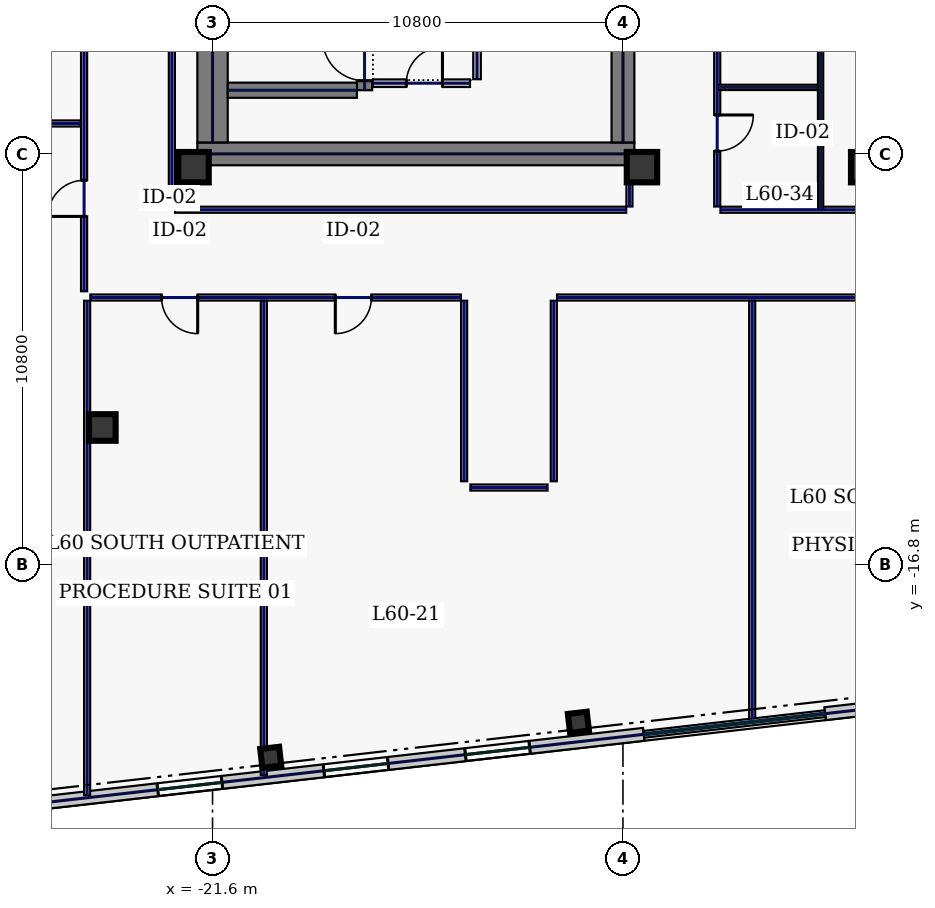
"""IFC4 building model, lengths in metres.
Left out: names, types, materials, properties, quantities, classifications, styles, units other than length and angle.
Written with IfcOpenShell. Run it as: python <this file> out.ifc"""

import sys

from ifc_helpers import new_model, si_unit, direction, frame, frame_2d, origin, origin_2d, place, context, subcontext, project, spatial, rectangle, hollow_rectangle, extrude, element, fill, save


model = new_model("IFC4")
c1 = context("Model", 3, precision=1e-05, world=origin(), true_north=direction((0.0, 1.0)))
c2 = subcontext(c1, "Body", "Model", "MODEL_VIEW")
j1 = project(units=[si_unit("LENGTHUNIT", "METRE"), si_unit("PLANEANGLEUNIT", "RADIAN")], contexts=[c1])
p1 = place(None, origin())
s1 = spatial("IfcSite", under=j1, at=p1, CompositionType="ELEMENT")
p2 = place(p1, origin())
s2 = spatial("IfcBuilding", under=s1, at=p2, CompositionType="ELEMENT")
p3 = place(p2, frame((0.0, 0.0, 259.0)))
s3 = spatial("IfcBuildingStorey", under=s2, at=p3, CompositionType="ELEMENT", Elevation=259.0)
p4 = place(p3, frame((-22.0, -6.0, 0.0), z_axis=(0.0, 0.0, 1.0), x_axis=(1.0, 0.0, 0.0)))
e1 = element("IfcWall", 1, at=p4, inside=s3, PredefinedType="SHEAR", context=c2, shape_type="SweptSolid", body=[
    extrude(rectangle(XDim=11.5, YDim=0.6, at=frame_2d((5.75, 0.0))), origin(), (0.0, 0.0, 1.0), 3.74),
])
p5 = place(p3, frame((-21.6, -5.7, 0.0), z_axis=(0.0, 0.0, 1.0), x_axis=(0.0, 1.0, 0.0)))
e2 = element("IfcWall", 2, at=p5, inside=s3, PredefinedType="SHEAR", context=c2, shape_type="SweptSolid", body=[
    extrude(rectangle(XDim=11.4, YDim=0.8, at=frame_2d((5.7, 0.0))), origin(), (0.0, 0.0, 1.0), 3.74),
])
p6 = place(p3, frame((-10.8, -5.7, 0.0), z_axis=(0.0, 0.0, 1.0), x_axis=(0.0, 1.0, 0.0)))
e3 = element("IfcWall", 3, at=p6, inside=s3, PredefinedType="SHEAR", context=c2, shape_type="SweptSolid", body=[
    extrude(rectangle(XDim=3.05, YDim=0.6, at=frame_2d((1.525, 0.0))), origin(), (0.0, 0.0, 1.0), 3.74),
])
p7 = place(p3, frame((-17.6, -4.325, 0.0), z_axis=(0.0, 0.0, 1.0), x_axis=(0.0, 1.0, 0.0)))
e4 = element("IfcWall", 4, at=p7, inside=s3, PredefinedType="SHEAR", context=c2, shape_type="SweptSolid", body=[
    extrude(rectangle(XDim=8.65, YDim=0.4, at=frame_2d((4.325, 0.0))), origin(), (0.0, 0.0, 1.0), 3.74),
])
p8 = place(p7, frame((0.25, 0.0, 0.0)))
e5 = element("IfcOpeningElement", 5, at=p8, cuts=e4, PredefinedType="OPENING", context=c2, shape_type="SweptSolid", body=[
    extrude(rectangle(XDim=1.1, YDim=2.2, at=frame_2d((0.55, 1.1))), frame((0.0, 0.21, 0.0), z_axis=(0.0, -1.0, 0.0), x_axis=(1.0, 0.0, 0.0)), (0.0, 0.0, 1.0), 0.42),
])
p9 = place(p3, frame((-21.2, -4.325, 0.0), z_axis=(0.0, 0.0, 1.0), x_axis=(1.0, 0.0, 0.0)))
e6 = element("IfcWall", 6, at=p9, inside=s3, PredefinedType="SHEAR", context=c2, shape_type="SweptSolid", body=[
    extrude(rectangle(XDim=3.4, YDim=0.4, at=frame_2d((1.7, 0.0))), origin(), (0.0, 0.0, 1.0), 3.74),
])
for number, where, z_axis, x_axis in (
    (7, (-22.1, -6.35, 0.0), (0.0, 0.0, 1.0), (1.0, 0.0, 0.0)),
    (8, (-10.3, -6.35, 0.0), (0.0, 0.0, 1.0), (1.0, 0.0, 0.0)),
    (9, (-4.4, -6.35, 0.0), (0.0, 0.0, 1.0), (1.0, 0.0, 0.0)),
):
    element("IfcColumn", number, at=place(p3, frame(where, z_axis=z_axis, x_axis=x_axis)), inside=s3, PredefinedType="COLUMN", context=c2, shape_type="SweptSolid", body=[
        extrude(hollow_rectangle(XDim=0.8, YDim=0.8, WallThickness=0.036, at=origin_2d()), origin(), (0.0, 0.0, 1.0), 3.74),
    ])
p10 = place(p3, frame((-24.5, -13.2, 0.0), z_axis=(0.0, 0.0, 1.0), x_axis=(1.0, 0.0, 0.0)))
e10 = element("IfcColumn", 10, at=p10, inside=s3, PredefinedType="COLUMN", context=c2, shape_type="SweptSolid", body=[
    extrude(hollow_rectangle(XDim=0.7, YDim=0.7, WallThickness=0.032, at=origin_2d()), origin(), (0.0, 0.0, 1.0), 3.74),
])
for number, where, z_axis, x_axis in (
    (11, (-20.069, -21.88, 0.0), (0.0, 0.0, 1.0), (0.994, 0.113, 0.0)),
    (12, (-11.972, -20.958, 0.0), (0.0, 0.0, 1.0), (0.994, 0.113, 0.0)),
):
    element("IfcColumn", number, at=place(p3, frame(where, z_axis=z_axis, x_axis=x_axis)), inside=s3, PredefinedType="COLUMN", context=c2, shape_type="SweptSolid", body=[
        extrude(hollow_rectangle(XDim=0.5, YDim=0.5, WallThickness=0.025, at=origin_2d()), origin(), (0.0, 0.0, 1.0), 3.74),
    ])
p11 = place(p3, frame((-28.783, -23.386, 0.0), z_axis=(0.0, 0.0, 1.0), x_axis=(0.993572271362, 0.113199565282, 0.0)))
e13 = element("IfcWall", 13, at=p11, inside=s3, PredefinedType="STANDARD", context=c2, shape_type="SweptSolid", body=[
    extrude(rectangle(XDim=18.651, YDim=0.34, at=frame_2d((9.326, 0.0))), origin(), (0.0, 0.0, 1.0), 3.74),
])
p12 = place(p11, frame((2.03, 0.0, 0.88)))
e14 = element("IfcOpeningElement", 14, at=p12, cuts=e13, PredefinedType="OPENING", context=c2, shape_type="SweptSolid", body=[
    extrude(rectangle(XDim=0.85, YDim=1.85, at=frame_2d((0.425, 0.925))), frame((0.0, 0.18, 0.0), z_axis=(0.0, -1.0, 0.0), x_axis=(1.0, 0.0, 0.0)), (0.0, 0.0, 1.0), 0.36),
])
p13 = place(p11, frame((5.779, 0.0, 0.88)))
e15 = element("IfcOpeningElement", 15, at=p13, cuts=e13, PredefinedType="OPENING", context=c2, shape_type="SweptSolid", body=[
    extrude(rectangle(XDim=1.7, YDim=1.95, at=frame_2d((0.85, 0.975))), frame((0.0, 0.18, 0.0), z_axis=(0.0, -1.0, 0.0), x_axis=(1.0, 0.0, 0.0)), (0.0, 0.0, 1.0), 0.36),
])
p14 = place(p11, frame((10.179, 0.0, 0.88)))
e16 = element("IfcOpeningElement", 16, at=p14, cuts=e13, PredefinedType="OPENING", context=c2, shape_type="SweptSolid", body=[
    extrude(rectangle(XDim=1.7, YDim=1.95, at=frame_2d((0.85, 0.975))), frame((0.0, 0.18, 0.0), z_axis=(0.0, -1.0, 0.0), x_axis=(1.0, 0.0, 0.0)), (0.0, 0.0, 1.0), 0.36),
])
p15 = place(p11, frame((13.927, 0.0, 0.88)))
e17 = element("IfcOpeningElement", 17, at=p15, cuts=e13, PredefinedType="OPENING", context=c2, shape_type="SweptSolid", body=[
    extrude(rectangle(XDim=1.7, YDim=1.95, at=frame_2d((0.85, 0.975))), frame((0.0, 0.18, 0.0), z_axis=(0.0, -1.0, 0.0), x_axis=(1.0, 0.0, 0.0)), (0.0, 0.0, 1.0), 0.36),
])
p16 = place(p3, frame((-5.482, -20.731, 0.0), z_axis=(0.0, 0.0, 1.0), x_axis=(0.993571968199, 0.113202226169, 0.0)))
e18 = element("IfcWall", 18, at=p16, inside=s3, PredefinedType="STANDARD", context=c2, shape_type="SweptSolid", body=[
    extrude(rectangle(XDim=11.497, YDim=0.34, at=frame_2d((5.749, 0.0))), origin(), (0.0, 0.0, 1.0), 3.74),
])
p17 = place(p16, frame((3.024, 0.0, 0.88)))
e19 = element("IfcOpeningElement", 19, at=p17, cuts=e18, PredefinedType="OPENING", context=c2, shape_type="SweptSolid", body=[
    extrude(rectangle(XDim=1.7, YDim=1.95, at=frame_2d((0.85, 0.975))), frame((0.0, 0.18, 0.0), z_axis=(0.0, -1.0, 0.0), x_axis=(1.0, 0.0, 0.0)), (0.0, 0.0, 1.0), 0.36),
])
p18 = place(p16, frame((7.623, 0.0, 0.88)))
e20 = element("IfcOpeningElement", 20, at=p18, cuts=e18, PredefinedType="OPENING", context=c2, shape_type="SweptSolid", body=[
    extrude(rectangle(XDim=0.85, YDim=1.85, at=frame_2d((0.425, 0.925))), frame((0.0, 0.18, 0.0), z_axis=(0.0, -1.0, 0.0), x_axis=(1.0, 0.0, 0.0)), (0.0, 0.0, 1.0), 0.36),
])
p19 = place(p3, frame((-17.38, -4.14, 0.0), z_axis=(0.0, 0.0, 1.0), x_axis=(1.0, 0.0, 0.0)))
e21 = element("IfcWall", 21, at=p19, inside=s3, PredefinedType="SOLIDWALL", context=c2, shape_type="SweptSolid", body=[
    extrude(rectangle(XDim=2.555, YDim=0.2, at=frame_2d((1.277, 0.0))), origin(), (0.0, 0.0, 1.0), 3.74),
])
p20 = place(p19, frame((0.88, 0.0, 0.0)))
e22 = element("IfcOpeningElement", 22, at=p20, cuts=e21, PredefinedType="OPENING", context=c2, shape_type="SweptSolid", body=[
    extrude(rectangle(XDim=0.95, YDim=2.2, at=frame_2d((0.475, 1.1))), frame((0.0, 0.11, 0.0), z_axis=(0.0, -1.0, 0.0), x_axis=(1.0, 0.0, 0.0)), (0.0, 0.0, 1.0), 0.22),
])
p21 = place(p3, frame((-14.64, -4.035, 0.0), z_axis=(0.0, 0.0, 1.0), x_axis=(0.0, 1.0, 0.0)))
e23 = element("IfcWall", 23, at=p21, inside=s3, PredefinedType="SOLIDWALL", context=c2, shape_type="SweptSolid", body=[
    extrude(rectangle(XDim=4.075, YDim=0.2, at=frame_2d((2.038, 0.0))), origin(), (0.0, 0.0, 1.0), 3.74),
])
p22 = place(p21, frame((2.09, 0.0, 0.0)))
e24 = element("IfcOpeningElement", 24, at=p22, cuts=e23, PredefinedType="OPENING", context=c2, shape_type="SweptSolid", body=[
    extrude(rectangle(XDim=1.2, YDim=2.2, at=frame_2d((0.6, 1.1))), frame((0.0, 0.11, 0.0), z_axis=(0.0, -1.0, 0.0), x_axis=(1.0, 0.0, 0.0)), (0.0, 0.0, 1.0), 0.22),
])
p23 = place(p3, frame((-24.98, -9.615, 0.0), z_axis=(0.0, 0.0, 1.0), x_axis=(0.0, 1.0, 0.0)))
e25 = element("IfcWall", 25, at=p23, inside=s3, PredefinedType="PARTITIONING", context=c2, shape_type="SweptSolid", body=[
    extrude(rectangle(XDim=19.28, YDim=0.16, at=frame_2d((9.64, 0.0))), origin(), (0.0, 0.0, 1.0), 3.74),
])
p24 = place(p23, frame((1.969, 0.0, 0.0)))
e26 = element("IfcOpeningElement", 26, at=p24, cuts=e25, PredefinedType="OPENING", context=c2, shape_type="SweptSolid", body=[
    extrude(rectangle(XDim=0.95, YDim=2.2, at=frame_2d((0.475, 1.1))), frame((0.0, 0.09, 0.0), z_axis=(0.0, -1.0, 0.0), x_axis=(1.0, 0.0, 0.0)), (0.0, 0.0, 1.0), 0.18),
])
p25 = place(p23, frame((7.25, 0.0, 0.0)))
e27 = element("IfcOpeningElement", 27, at=p25, cuts=e25, PredefinedType="OPENING", context=c2, shape_type="SweptSolid", body=[
    extrude(rectangle(XDim=0.95, YDim=2.2, at=frame_2d((0.475, 1.1))), frame((0.0, 0.09, 0.0), z_axis=(0.0, -1.0, 0.0), x_axis=(1.0, 0.0, 0.0)), (0.0, 0.0, 1.0), 0.18),
])
p26 = place(p23, frame((12.45, 0.0, 0.0)))
e28 = element("IfcOpeningElement", 28, at=p26, cuts=e25, PredefinedType="OPENING", context=c2, shape_type="SweptSolid", body=[
    extrude(rectangle(XDim=0.95, YDim=2.2, at=frame_2d((0.475, 1.1))), frame((0.0, 0.09, 0.0), z_axis=(0.0, -1.0, 0.0), x_axis=(1.0, 0.0, 0.0)), (0.0, 0.0, 1.0), 0.18),
])
p27 = place(p23, frame((16.506, 0.0, 0.0)))
e29 = element("IfcOpeningElement", 29, at=p27, cuts=e25, PredefinedType="OPENING", context=c2, shape_type="SweptSolid", body=[
    extrude(rectangle(XDim=0.95, YDim=2.2, at=frame_2d((0.475, 1.1))), frame((0.0, 0.09, 0.0), z_axis=(0.0, -1.0, 0.0), x_axis=(1.0, 0.0, 0.0)), (0.0, 0.0, 1.0), 0.18),
])
p28 = place(p3, frame((24.815, -9.78, 0.0), z_axis=(0.0, 0.0, 1.0), x_axis=(-1.0, 0.0, 0.0)))
e30 = element("IfcWall", 30, at=p28, inside=s3, PredefinedType="PARTITIONING", context=c2, shape_type="SweptSolid", body=[
    extrude(rectangle(XDim=37.35, YDim=0.16, at=frame_2d((18.675, 0.0))), origin(), (0.0, 0.0, 1.0), 3.74),
])
p29 = place(p28, frame((27.55, 0.0, 0.0)))
e31 = element("IfcOpeningElement", 31, at=p29, cuts=e30, PredefinedType="OPENING", context=c2, shape_type="SweptSolid", body=[
    extrude(rectangle(XDim=0.95, YDim=2.2, at=frame_2d((0.475, 1.1))), frame((0.0, 0.09, 0.0), z_axis=(0.0, -1.0, 0.0), x_axis=(1.0, 0.0, 0.0)), (0.0, 0.0, 1.0), 0.18),
])
p30 = place(p28, frame((19.275, 0.0, 0.0)))
e32 = element("IfcOpeningElement", 32, at=p30, cuts=e30, PredefinedType="OPENING", context=c2, shape_type="SweptSolid", body=[
    extrude(rectangle(XDim=1.3, YDim=2.2, at=frame_2d((0.65, 1.1))), frame((0.0, 0.09, 0.0), z_axis=(0.0, -1.0, 0.0), x_axis=(1.0, 0.0, 0.0)), (0.0, 0.0, 1.0), 0.18),
])
p31 = place(p28, frame((9.725, 0.0, 0.0)))
e33 = element("IfcOpeningElement", 33, at=p31, cuts=e30, PredefinedType="OPENING", context=c2, shape_type="SweptSolid", body=[
    extrude(rectangle(XDim=1.3, YDim=2.2, at=frame_2d((0.65, 1.1))), frame((0.0, 0.09, 0.0), z_axis=(0.0, -1.0, 0.0), x_axis=(1.0, 0.0, 0.0)), (0.0, 0.0, 1.0), 0.18),
])
p32 = place(p28, frame((2.044, 0.0, 0.0)))
e34 = element("IfcOpeningElement", 34, at=p32, cuts=e30, PredefinedType="OPENING", context=c2, shape_type="SweptSolid", body=[
    extrude(rectangle(XDim=0.95, YDim=2.2, at=frame_2d((0.475, 1.1))), frame((0.0, 0.09, 0.0), z_axis=(0.0, -1.0, 0.0), x_axis=(1.0, 0.0, 0.0)), (0.0, 0.0, 1.0), 0.18),
])
p33 = place(p3, frame((-12.62, -9.865, 0.0), z_axis=(0.0, 0.0, 1.0), x_axis=(0.0, -1.0, 0.0)))
e35 = element("IfcWall", 35, at=p33, inside=s3, PredefinedType="PARTITIONING", context=c2, shape_type="SweptSolid", body=[
    extrude(rectangle(XDim=4.75, YDim=0.16, at=frame_2d((2.375, 0.0))), origin(), (0.0, 0.0, 1.0), 3.74),
])
p34 = place(p3, frame((-12.785, -14.78, 0.0), z_axis=(0.0, 0.0, 1.0), x_axis=(-1.0, 0.0, 0.0)))
e36 = element("IfcWall", 36, at=p34, inside=s3, PredefinedType="PARTITIONING", context=c2, shape_type="SweptSolid", body=[
    extrude(rectangle(XDim=2.03, YDim=0.16, at=frame_2d((1.015, 0.0))), origin(), (0.0, 0.0, 1.0), 3.74),
])
p35 = place(p3, frame((-14.98, -14.615, 0.0), z_axis=(0.0, 0.0, 1.0), x_axis=(0.0, 1.0, 0.0)))
e37 = element("IfcWall", 37, at=p35, inside=s3, PredefinedType="PARTITIONING", context=c2, shape_type="SweptSolid", body=[
    extrude(rectangle(XDim=4.75, YDim=0.16, at=frame_2d((2.375, 0.0))), origin(), (0.0, 0.0, 1.0), 3.74),
])
p36 = place(p3, frame((-15.065, -9.78, 0.0), z_axis=(0.0, 0.0, 1.0), x_axis=(-1.0, 0.0, 0.0)))
e38 = element("IfcWall", 38, at=p36, inside=s3, PredefinedType="PARTITIONING", context=c2, shape_type="SweptSolid", body=[
    extrude(rectangle(XDim=9.75, YDim=0.16, at=frame_2d((4.875, 0.0))), origin(), (0.0, 0.0, 1.0), 3.74),
])
p37 = place(p36, frame((6.926, 0.0, 0.0)))
e39 = element("IfcOpeningElement", 39, at=p37, cuts=e38, PredefinedType="OPENING", context=c2, shape_type="SweptSolid", body=[
    extrude(rectangle(XDim=0.95, YDim=2.2, at=frame_2d((0.475, 1.1))), frame((0.0, 0.09, 0.0), z_axis=(0.0, -1.0, 0.0), x_axis=(1.0, 0.0, 0.0)), (0.0, 0.0, 1.0), 0.18),
])
p38 = place(p36, frame((2.354, 0.0, 0.0)))
e40 = element("IfcOpeningElement", 40, at=p38, cuts=e38, PredefinedType="OPENING", context=c2, shape_type="SweptSolid", body=[
    extrude(rectangle(XDim=0.95, YDim=2.2, at=frame_2d((0.475, 1.1))), frame((0.0, 0.09, 0.0), z_axis=(0.0, -1.0, 0.0), x_axis=(1.0, 0.0, 0.0)), (0.0, 0.0, 1.0), 0.18),
])
p39 = place(p3, frame((-8.32, 7.435, 0.0), z_axis=(0.0, 0.0, 1.0), x_axis=(0.0, -1.0, 0.0)))
e41 = element("IfcWall", 41, at=p39, inside=s3, PredefinedType="PARTITIONING", context=c2, shape_type="SweptSolid", body=[
    extrude(rectangle(XDim=14.82, YDim=0.16, at=frame_2d((7.41, 0.0))), origin(), (0.0, 0.0, 1.0), 3.74),
])
p40 = place(p39, frame((12.411, 0.0, 0.0)))
e42 = element("IfcOpeningElement", 42, at=p40, cuts=e41, PredefinedType="OPENING", context=c2, shape_type="SweptSolid", body=[
    extrude(rectangle(XDim=0.95, YDim=2.2, at=frame_2d((0.475, 1.1))), frame((0.0, 0.09, 0.0), z_axis=(0.0, -1.0, 0.0), x_axis=(1.0, 0.0, 0.0)), (0.0, 0.0, 1.0), 0.18),
])
p41 = place(p39, frame((5.604, 0.0, 0.0)))
e43 = element("IfcOpeningElement", 43, at=p41, cuts=e41, PredefinedType="OPENING", context=c2, shape_type="SweptSolid", body=[
    extrude(rectangle(XDim=0.95, YDim=2.2, at=frame_2d((0.475, 1.1))), frame((0.0, 0.09, 0.0), z_axis=(0.0, -1.0, 0.0), x_axis=(1.0, 0.0, 0.0)), (0.0, 0.0, 1.0), 0.18),
])
p42 = place(p3, frame((-8.235, -7.47, 0.0), z_axis=(0.0, 0.0, 1.0), x_axis=(1.0, 0.0, 0.0)))
e44 = element("IfcWall", 44, at=p42, inside=s3, PredefinedType="PARTITIONING", context=c2, shape_type="SweptSolid", body=[
    extrude(rectangle(XDim=4.27, YDim=0.16, at=frame_2d((2.135, 0.0))), origin(), (0.0, 0.0, 1.0), 3.74),
])
p43 = place(p3, frame((-10.63, -7.385, 0.0), z_axis=(0.0, 0.0, 1.0), x_axis=(0.0, 1.0, 0.0)))
e45 = element("IfcWall", 45, at=p43, inside=s3, PredefinedType="PARTITIONING", context=c2, shape_type="SweptSolid", body=[
    extrude(rectangle(XDim=0.965, YDim=0.16, at=frame_2d((0.482, 0.0))), origin(), (0.0, 0.0, 1.0), 3.74),
])
p44 = place(p3, frame((-22.67, 7.435, 0.0), z_axis=(0.0, 0.0, 1.0), x_axis=(0.0, -1.0, 0.0)))
e46 = element("IfcWall", 46, at=p44, inside=s3, PredefinedType="PARTITIONING", context=c2, shape_type="SweptSolid", body=[
    extrude(rectangle(XDim=14.82, YDim=0.16, at=frame_2d((7.41, 0.0))), origin(), (0.0, 0.0, 1.0), 3.74),
])
p45 = place(p3, frame((-22.585, -7.47, 0.0), z_axis=(0.0, 0.0, 1.0), x_axis=(1.0, 0.0, 0.0)))
e47 = element("IfcWall", 47, at=p45, inside=s3, PredefinedType="PARTITIONING", context=c2, shape_type="SweptSolid", body=[
    extrude(rectangle(XDim=11.87, YDim=0.16, at=frame_2d((5.935, 0.0))), origin(), (0.0, 0.0, 1.0), 3.74),
])
p46 = place(p3, frame((-24.9, -22.873, 0.0), z_axis=(0.0, 0.0, 1.0), x_axis=(0.0, 1.0, 0.0)))
e48 = element("IfcWall", 48, at=p46, inside=s3, PredefinedType="PARTITIONING", context=c2, shape_type="SweptSolid", body=[
    extrude(rectangle(XDim=13.008, YDim=0.16, at=frame_2d((6.504, 0.0))), origin(), (0.0, 0.0, 1.0), 3.74),
])
p47 = place(p3, frame((-20.25, -22.344, 0.0), z_axis=(0.0, 0.0, 1.0), x_axis=(0.0, 1.0, 0.0)))
e49 = element("IfcWall", 49, at=p47, inside=s3, PredefinedType="PARTITIONING", context=c2, shape_type="SweptSolid", body=[
    extrude(rectangle(XDim=12.479, YDim=0.16, at=frame_2d((6.239, 0.0))), origin(), (0.0, 0.0, 1.0), 3.74),
])
p48 = place(p3, frame((-7.4, -20.879, 0.0), z_axis=(0.0, 0.0, 1.0), x_axis=(0.0, 1.0, 0.0)))
e50 = element("IfcWall", 50, at=p48, inside=s3, PredefinedType="PARTITIONING", context=c2, shape_type="SweptSolid", body=[
    extrude(rectangle(XDim=11.014, YDim=0.16, at=frame_2d((5.507, 0.0))), origin(), (0.0, 0.0, 1.0), 3.74),
])
p49 = place(p3, frame((-35.494, -5.2, 0.0), z_axis=(0.0, 0.0, 1.0), x_axis=(1.0, 0.0, 0.0)))
e51 = element("IfcWall", 51, at=p49, inside=s3, PredefinedType="PARTITIONING", context=c2, shape_type="SweptSolid", body=[
    extrude(rectangle(XDim=10.429, YDim=0.16, at=frame_2d((5.215, 0.0))), origin(), (0.0, 0.0, 1.0), 3.74),
])
p50 = place(p3, frame((-5.6, -7.465, 0.0), z_axis=(0.0, 0.0, 1.0), x_axis=(0.0, 1.0, 0.0)))
e52 = element("IfcWall", 52, at=p50, inside=s3, PredefinedType="PARTITIONING", context=c2, shape_type="SweptSolid", body=[
    extrude(rectangle(XDim=14.98, YDim=0.14, at=frame_2d((7.49, 0.0))), origin(), (0.0, 0.0, 1.0), 3.74),
])
p51 = place(p3, frame((-8.315, -4.25, 0.0), z_axis=(0.0, 0.0, 1.0), x_axis=(1.0, 0.0, 0.0)))
e53 = element("IfcWall", 53, at=p51, inside=s3, PredefinedType="PARTITIONING", context=c2, shape_type="SweptSolid", body=[
    extrude(rectangle(XDim=2.64, YDim=0.14, at=frame_2d((1.32, 0.0))), origin(), (0.0, 0.0, 1.0), 3.74),
])
p52 = place(p13, origin())
e54 = element("IfcWindow", 54, at=p52, inside=s3, PartitioningType="SINGLE_PANEL", PredefinedType="WINDOW", context=c2, shape_type="SweptSolid", body=[
    extrude(rectangle(XDim=1.7, YDim=1.95, at=frame_2d((0.85, 0.975))), frame((0.0, 0.03, 0.0), z_axis=(0.0, -1.0, 0.0), x_axis=(1.0, 0.0, 0.0)), (0.0, 0.0, 1.0), 0.06),
])
fill(e15, e54)
p53 = place(p14, origin())
e55 = element("IfcWindow", 55, at=p53, inside=s3, PartitioningType="SINGLE_PANEL", PredefinedType="WINDOW", context=c2, shape_type="SweptSolid", body=[
    extrude(rectangle(XDim=1.7, YDim=1.95, at=frame_2d((0.85, 0.975))), frame((0.0, 0.03, 0.0), z_axis=(0.0, -1.0, 0.0), x_axis=(1.0, 0.0, 0.0)), (0.0, 0.0, 1.0), 0.06),
])
fill(e16, e55)
p54 = place(p15, origin())
e56 = element("IfcWindow", 56, at=p54, inside=s3, PartitioningType="SINGLE_PANEL", PredefinedType="WINDOW", context=c2, shape_type="SweptSolid", body=[
    extrude(rectangle(XDim=1.7, YDim=1.95, at=frame_2d((0.85, 0.975))), frame((0.0, 0.03, 0.0), z_axis=(0.0, -1.0, 0.0), x_axis=(1.0, 0.0, 0.0)), (0.0, 0.0, 1.0), 0.06),
])
fill(e17, e56)
p55 = place(p8, origin())
e57 = element("IfcDoor", 57, at=p55, inside=s3, OperationType="SINGLE_SWING_RIGHT", PredefinedType="DOOR", context=c2, shape_type="SweptSolid", body=[
    extrude(rectangle(XDim=1.1, YDim=2.2, at=frame_2d((0.55, 1.1))), frame((0.0, 0.025, 0.0), z_axis=(0.0, -1.0, 0.0), x_axis=(1.0, 0.0, 0.0)), (0.0, 0.0, 1.0), 0.05),
])
fill(e5, e57)
p56 = place(p20, origin())
e58 = element("IfcDoor", 58, at=p56, inside=s3, OperationType="SINGLE_SWING_RIGHT", PredefinedType="DOOR", context=c2, shape_type="SweptSolid", body=[
    extrude(rectangle(XDim=0.95, YDim=2.2, at=frame_2d((0.475, 1.1))), frame((0.0, 0.025, 0.0), z_axis=(0.0, -1.0, 0.0), x_axis=(1.0, 0.0, 0.0)), (0.0, 0.0, 1.0), 0.05),
])
fill(e22, e58)
p57 = place(p37, origin())
e59 = element("IfcDoor", 59, at=p57, inside=s3, OperationType="SINGLE_SWING_LEFT", PredefinedType="DOOR", context=c2, shape_type="SweptSolid", body=[
    extrude(rectangle(XDim=0.95, YDim=2.2, at=frame_2d((0.475, 1.1))), frame((0.0, 0.025, 0.0), z_axis=(0.0, -1.0, 0.0), x_axis=(1.0, 0.0, 0.0)), (0.0, 0.0, 1.0), 0.05),
])
fill(e39, e59)
p58 = place(p38, origin())
e60 = element("IfcDoor", 60, at=p58, inside=s3, OperationType="SINGLE_SWING_RIGHT", PredefinedType="DOOR", context=c2, shape_type="SweptSolid", body=[
    extrude(rectangle(XDim=0.95, YDim=2.2, at=frame_2d((0.475, 1.1))), frame((0.0, 0.025, 0.0), z_axis=(0.0, -1.0, 0.0), x_axis=(1.0, 0.0, 0.0)), (0.0, 0.0, 1.0), 0.05),
])
fill(e40, e60)
p59 = place(p24, origin())
e61 = element("IfcDoor", 61, at=p59, inside=s3, OperationType="SINGLE_SWING_LEFT", PredefinedType="DOOR", context=c2, shape_type="SweptSolid", body=[
    extrude(rectangle(XDim=0.95, YDim=2.2, at=frame_2d((0.475, 1.1))), frame((0.0, 0.025, 0.0), z_axis=(0.0, -1.0, 0.0), x_axis=(1.0, 0.0, 0.0)), (0.0, 0.0, 1.0), 0.05),
])
fill(e26, e61)
p60 = place(p40, origin())
e62 = element("IfcDoor", 62, at=p60, inside=s3, OperationType="SINGLE_SWING_LEFT", PredefinedType="DOOR", context=c2, shape_type="SweptSolid", body=[
    extrude(rectangle(XDim=0.95, YDim=2.2, at=frame_2d((0.475, 1.1))), frame((0.0, 0.025, 0.0), z_axis=(0.0, -1.0, 0.0), x_axis=(1.0, 0.0, 0.0)), (0.0, 0.0, 1.0), 0.05),
])
fill(e42, e62)
save(model, sys.argv[1])
